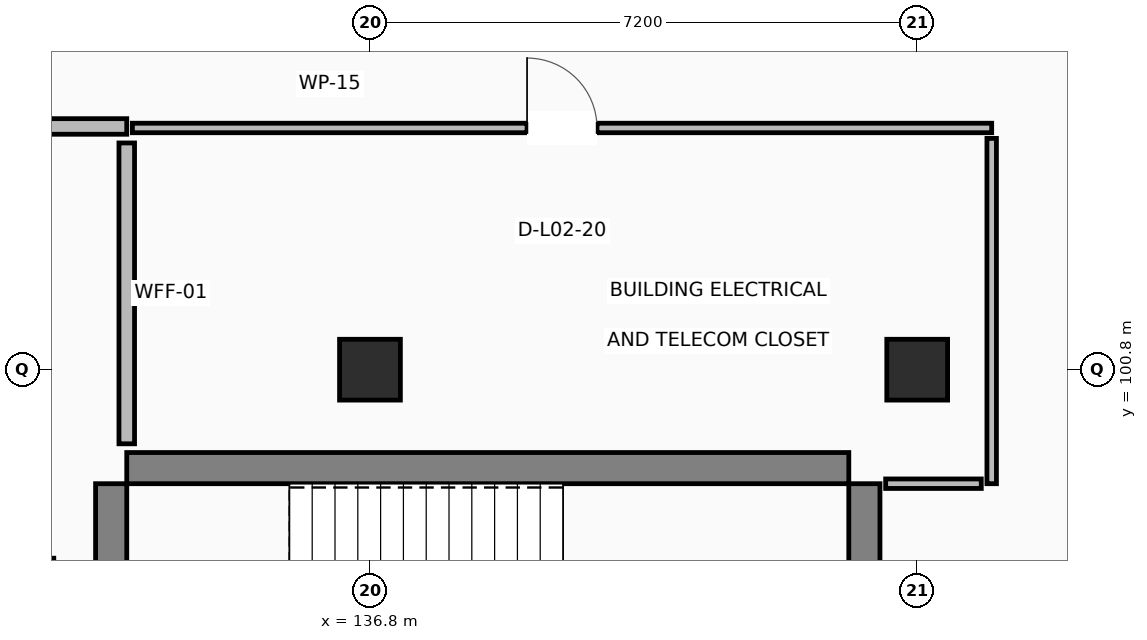
"""IFC4 building model, lengths in metres.
Left out: names, types, materials, properties, quantities, classifications, styles, units other than length and angle.
Written with IfcOpenShell. Run it as: python <this file> out.ifc"""

import sys

from ifc_helpers import new_model, si_unit, direction, frame, frame_2d, origin, origin_2d, place, context, subcontext, project, spatial, rectangle, extrude, element, fill, save


model = new_model("IFC4")
c1 = context("Model", 3, precision=1e-05, world=origin(), true_north=direction((0.0, 1.0)))
c2 = subcontext(c1, "Body", "Model", "MODEL_VIEW")
j1 = project(units=[si_unit("LENGTHUNIT", "METRE"), si_unit("PLANEANGLEUNIT", "RADIAN")], contexts=[c1])
p1 = place(None, origin())
s1 = spatial("IfcSite", under=j1, at=p1, CompositionType="ELEMENT")
p2 = place(p1, origin())
s2 = spatial("IfcBuilding", under=s1, at=p2, CompositionType="ELEMENT")
p3 = place(p2, frame((0.0, 0.0, 9.0)))
s3 = spatial("IfcBuildingStorey", under=s2, at=p3, CompositionType="ELEMENT", Elevation=9.0)
for number, where, z_axis, x_axis in (
    (1, (136.8, 100.8, 0.0), (0.0, 0.0, 1.0), (1.0, 0.0, 0.0)),
    (2, (144.0, 100.8, 0.0), (0.0, 0.0, 1.0), (1.0, 0.0, 0.0)),
):
    element("IfcColumn", number, at=place(p3, frame(where, z_axis=z_axis, x_axis=x_axis)), inside=s3, PredefinedType="COLUMN", context=c2, shape_type="SweptSolid", body=[
        extrude(rectangle(XDim=0.8, YDim=0.8, at=origin_2d()), origin(), (0.0, 0.0, 1.0), 4.22),
    ])
p4 = place(p3, frame((133.6, 99.505, 0.0), z_axis=(0.0, 0.0, 1.0), x_axis=(1.0, 0.0, 0.0)))
e3 = element("IfcWall", 3, at=p4, inside=s3, PredefinedType="SHEAR", context=c2, shape_type="SweptSolid", body=[
    extrude(rectangle(XDim=9.5, YDim=0.41, at=frame_2d((4.75, 0.0))), origin(), (0.0, 0.0, 1.0), 4.22),
])
p5 = place(p3, frame((133.395, 94.8, 0.0), z_axis=(0.0, 0.0, 1.0), x_axis=(0.0, 1.0, 0.0)))
e4 = element("IfcWall", 4, at=p5, inside=s3, PredefinedType="SHEAR", context=c2, shape_type="SweptSolid", body=[
    extrude(rectangle(XDim=4.5, YDim=0.41, at=frame_2d((2.25, 0.0))), origin(), (0.0, 0.0, 1.0), 4.22),
])
p6 = place(p5, frame((1.7, 0.0, 0.0)))
e5 = element("IfcOpeningElement", 5, at=p6, cuts=e4, PredefinedType="OPENING", context=c2, shape_type="SweptSolid", body=[
    extrude(rectangle(XDim=1.1, YDim=2.15, at=frame_2d((0.55, 1.075))), frame((0.0, 0.215, 0.0), z_axis=(0.0, -1.0, 0.0), x_axis=(1.0, 0.0, 0.0)), (0.0, 0.0, 1.0), 0.43),
])
p7 = place(p3, frame((143.305, 94.8, 0.0), z_axis=(0.0, 0.0, 1.0), x_axis=(0.0, 1.0, 0.0)))
e6 = element("IfcWall", 6, at=p7, inside=s3, PredefinedType="SHEAR", context=c2, shape_type="SweptSolid", body=[
    extrude(rectangle(XDim=4.5, YDim=0.41, at=frame_2d((2.25, 0.0))), origin(), (0.0, 0.0, 1.0), 4.22),
])
p8 = place(p3, frame((132.53, 95.68, 0.0), z_axis=(0.0, 0.0, 1.0), x_axis=(0.0, 1.0, 0.0)))
e7 = element("IfcWall", 7, at=p8, inside=s3, PredefinedType="STANDARD", context=c2, shape_type="SweptSolid", body=[
    extrude(rectangle(XDim=2.64, YDim=0.22, at=frame_2d((1.32, 0.0))), origin(), (0.0, 0.0, 1.0), 3.26),
])
p9 = place(p3, frame((129.4, 104.0, 0.0), z_axis=(0.0, 0.0, 1.0), x_axis=(1.0, 0.0, 0.0)))
e8 = element("IfcWall", 8, at=p9, inside=s3, PredefinedType="PARTITIONING", context=c2, shape_type="SweptSolid", body=[
    extrude(rectangle(XDim=4.2, YDim=0.205, at=frame_2d((2.1, 0.0))), origin(), (0.0, 0.0, 1.0), 3.26),
])
p10 = place(p9, frame((1.5, 0.0, 0.0)))
e9 = element("IfcOpeningElement", 9, at=p10, cuts=e8, PredefinedType="OPENING", context=c2, shape_type="SweptSolid", body=[
    extrude(rectangle(XDim=1.2, YDim=2.15, at=frame_2d((0.6, 1.075))), frame((0.0, 0.113, 0.0), z_axis=(0.0, -1.0, 0.0), x_axis=(1.0, 0.0, 0.0)), (0.0, 0.0, 1.0), 0.225),
])
p11 = place(p3, frame((133.6, 103.783, 0.0), z_axis=(0.0, 0.0, 1.0), x_axis=(0.0, -1.0, 0.0)))
e10 = element("IfcWall", 10, at=p11, inside=s3, PredefinedType="PARTITIONING", context=c2, shape_type="SweptSolid", body=[
    extrude(rectangle(XDim=3.958, YDim=0.205, at=frame_2d((1.979, 0.0))), origin(), (0.0, 0.0, 1.0), 3.26),
])
p12 = place(p3, frame((133.674, 103.98, 0.0), z_axis=(0.0, 0.0, 1.0), x_axis=(1.0, 0.0, 0.0)))
e11 = element("IfcWall", 11, at=p12, inside=s3, PredefinedType="PARTITIONING", context=c2, shape_type="SweptSolid", body=[
    extrude(rectangle(XDim=11.306, YDim=0.125, at=frame_2d((5.653, 0.0))), origin(), (0.0, 0.0, 1.0), 3.26),
])
p13 = place(p12, frame((5.193, 0.0, 0.0)))
e12 = element("IfcOpeningElement", 12, at=p13, cuts=e11, PredefinedType="OPENING", context=c2, shape_type="SweptSolid", body=[
    extrude(rectangle(XDim=0.92, YDim=2.1, at=frame_2d((0.46, 1.05))), frame((0.0, 0.073, 0.0), z_axis=(0.0, -1.0, 0.0), x_axis=(1.0, 0.0, 0.0)), (0.0, 0.0, 1.0), 0.145),
])
p14 = place(p3, frame((144.98, 103.843, 0.0), z_axis=(0.0, 0.0, 1.0), x_axis=(0.0, -1.0, 0.0)))
e13 = element("IfcWall", 13, at=p14, inside=s3, PredefinedType="PARTITIONING", context=c2, shape_type="SweptSolid", body=[
    extrude(rectangle(XDim=4.543, YDim=0.125, at=frame_2d((2.271, 0.0))), origin(), (0.0, 0.0, 1.0), 3.26),
])
p15 = place(p3, frame((144.843, 99.3, 0.0), z_axis=(0.0, 0.0, 1.0), x_axis=(-1.0, 0.0, 0.0)))
e14 = element("IfcWall", 14, at=p15, inside=s3, PredefinedType="PARTITIONING", context=c2, shape_type="SweptSolid", body=[
    extrude(rectangle(XDim=1.258, YDim=0.125, at=frame_2d((0.629, 0.0))), origin(), (0.0, 0.0, 1.0), 3.26),
])
p16 = place(p13, origin())
e15 = element("IfcDoor", 15, at=p16, inside=s3, OperationType="SINGLE_SWING_LEFT", PredefinedType="DOOR", context=c2, shape_type="SweptSolid", body=[
    extrude(rectangle(XDim=0.92, YDim=2.1, at=frame_2d((0.46, 1.05))), frame((0.0, 0.025, 0.0), z_axis=(0.0, -1.0, 0.0), x_axis=(1.0, 0.0, 0.0)), (0.0, 0.0, 1.0), 0.05),
])
fill(e12, e15)
save(model, sys.argv[1])
